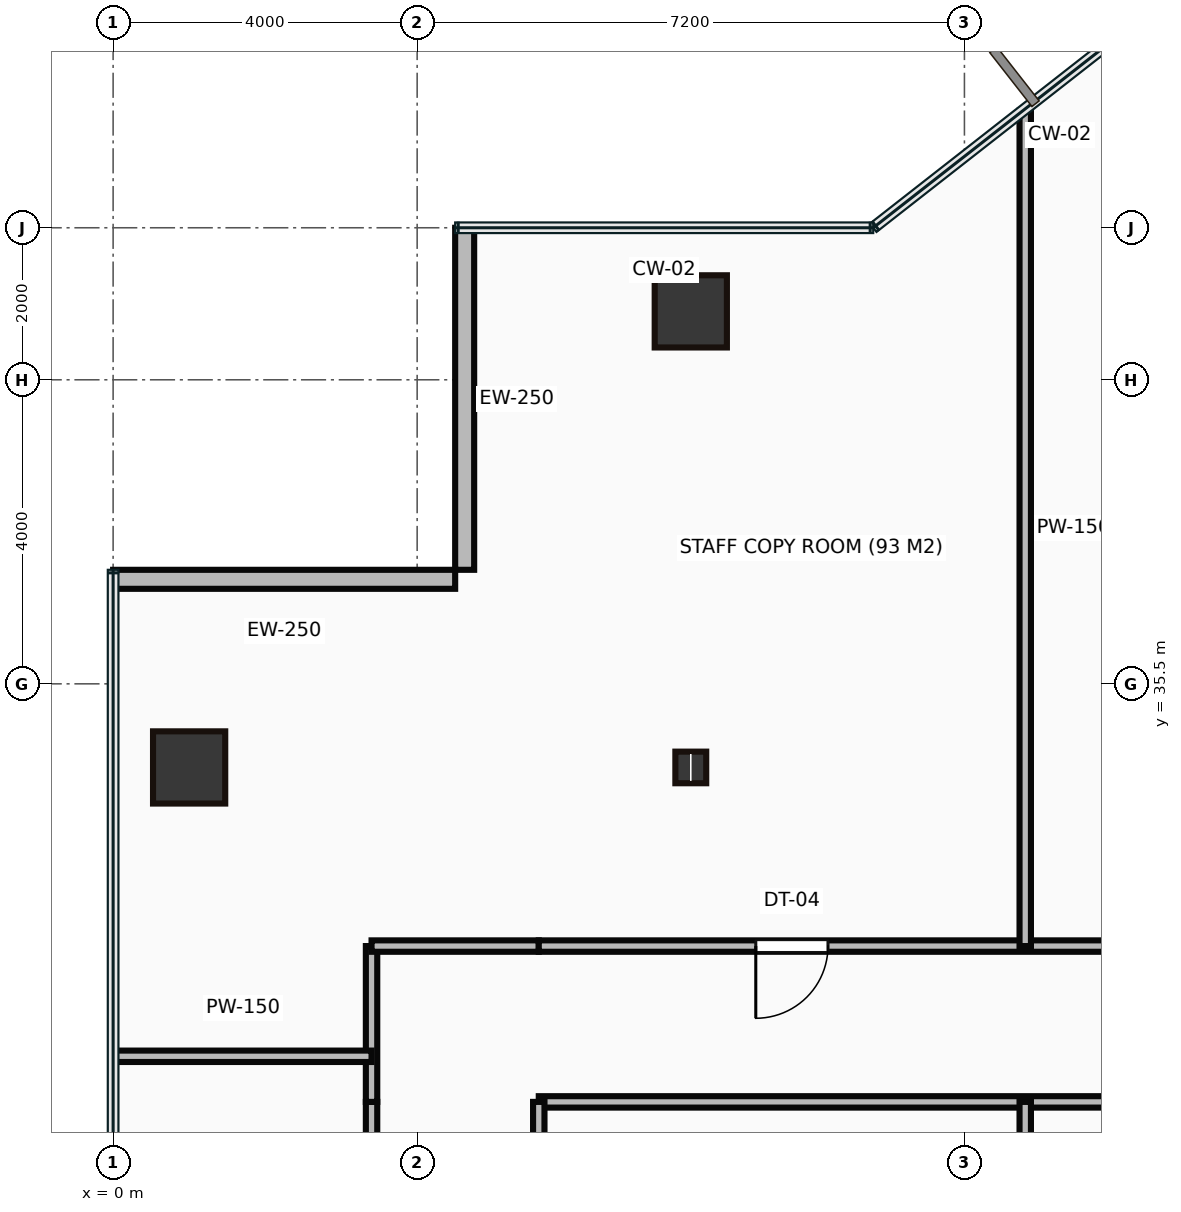
"""IFC4 building model, lengths in metres.
Left out: names, types, materials, properties, quantities, classifications, styles, units other than length and angle.
Written with IfcOpenShell. Run it as: python <this file> out.ifc"""

import sys

from ifc_helpers import new_model, si_unit, direction, frame, frame_2d, origin, origin_2d, place, context, subcontext, project, spatial, rectangle, hollow_rectangle, i_section, extrude, source, transform, mapped, element, fill, save


model = new_model("IFC4")
c1 = context("Model", 3, precision=1e-05, world=origin(), true_north=direction((0.0, 1.0)))
c2 = subcontext(c1, "Body", "Model", "MODEL_VIEW")
j1 = project(units=[si_unit("LENGTHUNIT", "METRE"), si_unit("PLANEANGLEUNIT", "RADIAN")], contexts=[c1])
p1 = place(None, origin())
s1 = spatial("IfcSite", under=j1, at=p1, CompositionType="ELEMENT")
p2 = place(p1, origin())
s2 = spatial("IfcBuilding", under=s1, at=p2, CompositionType="ELEMENT")
p3 = place(p2, frame((0.0, 0.0, 65.35)))
s3 = spatial("IfcBuildingStorey", under=s2, at=p3, CompositionType="ELEMENT", Elevation=65.35)
m1 = source(origin(), c2, "Body", "SweptSolid", [
    extrude(hollow_rectangle(XDim=0.95, YDim=0.95, WallThickness=0.045, at=origin_2d()), origin(), (0.0, 0.0, 1.0), 3.65),
])
p4 = place(p3, frame((1.0, 34.4, 0.0), z_axis=(0.0, 0.0, 1.0), x_axis=(1.0, 0.0, 0.0)))
e1 = element("IfcColumn", 1, at=p4, inside=s3, PredefinedType="COLUMN", context=c2, shape_type="MappedRepresentation", body=[
    mapped(m1, transform((0.0, 0.0, 0.0))),
])
m2 = source(origin(), c2, "Body", "SweptSolid", [
    extrude(i_section(OverallWidth=0.406, OverallDepth=0.416, WebThickness=0.03, FlangeThickness=0.048, at=origin_2d()), origin(), (0.0, 0.0, 1.0), 3.65),
])
p5 = place(p3, frame((7.6, 34.4, 0.0), z_axis=(0.0, 0.0, 1.0), x_axis=(1.0, 0.0, 0.0)))
e2 = element("IfcColumn", 2, at=p5, inside=s3, PredefinedType="COLUMN", context=c2, shape_type="MappedRepresentation", body=[
    mapped(m2, transform((0.0, 0.0, 0.0))),
])
p6 = place(p3, frame((7.6, 40.4, 0.0), z_axis=(0.0, 0.0, 1.0), x_axis=(1.0, 0.0, 0.0)))
e3 = element("IfcColumn", 3, at=p6, inside=s3, PredefinedType="COLUMN", context=c2, shape_type="MappedRepresentation", body=[
    mapped(m1, transform((0.0, 0.0, 0.0))),
])
m3 = source(origin(), c2, "Body", "SweptSolid", [
    extrude(rectangle(XDim=4.5, YDim=0.25, at=frame_2d((2.25, 0.0))), origin(), (0.0, 0.0, 1.0), 3.4),
])
for number, where, z_axis, x_axis in (
    (4, (4.625, 41.5, 0.0), (0.0, 0.0, 1.0), (0.0, -1.0, 0.0)),
    (5, (4.5, 36.875, 0.0), (0.0, 0.0, 1.0), (-1.0, 0.0, 0.0)),
):
    element("IfcWall", number, at=place(p3, frame(where, z_axis=z_axis, x_axis=x_axis)), inside=s3, PredefinedType="STANDARD", context=c2, shape_type="MappedRepresentation", body=[
        mapped(m3, transform((0.0, 0.0, 0.0))),
    ])
m4 = source(origin(), c2, "Body", "SweptSolid", [
    extrude(rectangle(XDim=13.75, YDim=0.15, at=frame_2d((6.875, 0.0))), origin(), (0.0, 0.0, 1.0), 3.4),
])
p7 = place(p3, frame((3.4, 16.25, 0.0), z_axis=(0.0, 0.0, 1.0), x_axis=(0.0, 1.0, 0.0)))
e6 = element("IfcWall", 6, at=p7, inside=s3, PredefinedType="PARTITIONING", context=c2, shape_type="MappedRepresentation", body=[
    mapped(m4, transform((0.0, 0.0, 0.0))),
])
p8 = place(p7, frame((6.4, 0.0, 0.0)))
e7 = element("IfcOpeningElement", 7, at=p8, cuts=e6, PredefinedType="OPENING", context=c2, shape_type="SweptSolid", body=[
    extrude(rectangle(XDim=0.95, YDim=2.15, at=frame_2d((0.475, 1.075))), frame((0.0, 0.085, 0.0), z_axis=(0.0, -1.0, 0.0), x_axis=(1.0, 0.0, 0.0)), (0.0, 0.0, 1.0), 0.17),
])
m5 = source(origin(), c2, "Body", "SweptSolid", [
    extrude(rectangle(XDim=2.05, YDim=0.15, at=frame_2d((1.025, 0.0))), origin(), (0.0, 0.0, 1.0), 3.4),
])
p9 = place(p3, frame((3.4, 30.0, 0.0), z_axis=(0.0, 0.0, 1.0), x_axis=(0.0, 1.0, 0.0)))
e8 = element("IfcWall", 8, at=p9, inside=s3, PredefinedType="PARTITIONING", context=c2, shape_type="MappedRepresentation", body=[
    mapped(m5, transform((0.0, 0.0, 0.0))),
])
m6 = source(origin(), c2, "Body", "SweptSolid", [
    extrude(rectangle(XDim=2.2, YDim=0.15, at=frame_2d((1.1, 0.0))), origin(), (0.0, 0.0, 1.0), 3.4),
])
p10 = place(p3, frame((3.4, 32.05, 0.0), z_axis=(0.0, 0.0, 1.0), x_axis=(1.0, 0.0, 0.0)))
e9 = element("IfcWall", 9, at=p10, inside=s3, PredefinedType="PARTITIONING", context=c2, shape_type="MappedRepresentation", body=[
    mapped(m6, transform((0.0, 0.0, 0.0))),
])
m7 = source(origin(), c2, "Body", "SweptSolid", [
    extrude(rectangle(XDim=31.6, YDim=0.15, at=frame_2d((15.8, 0.0))), origin(), (0.0, 0.0, 1.0), 3.4),
])
p11 = place(p3, frame((5.6, 32.05, 0.0), z_axis=(0.0, 0.0, 1.0), x_axis=(1.0, 0.0, 0.0)))
e10 = element("IfcWall", 10, at=p11, inside=s3, PredefinedType="PARTITIONING", context=c2, shape_type="MappedRepresentation", body=[
    mapped(m7, transform((0.0, 0.0, 0.0))),
])
p12 = place(p11, frame((2.855, 0.0, 0.0)))
e11 = element("IfcOpeningElement", 11, at=p12, cuts=e10, PredefinedType="OPENING", context=c2, shape_type="SweptSolid", body=[
    extrude(rectangle(XDim=0.95, YDim=2.15, at=frame_2d((0.475, 1.075))), frame((0.0, 0.085, 0.0), z_axis=(0.0, -1.0, 0.0), x_axis=(1.0, 0.0, 0.0)), (0.0, 0.0, 1.0), 0.17),
])
p13 = place(p11, frame((10.125, 0.0, 0.0)))
e12 = element("IfcOpeningElement", 12, at=p13, cuts=e10, PredefinedType="OPENING", context=c2, shape_type="SweptSolid", body=[
    extrude(rectangle(XDim=0.95, YDim=2.15, at=frame_2d((0.475, 1.075))), frame((0.0, 0.085, 0.0), z_axis=(0.0, -1.0, 0.0), x_axis=(1.0, 0.0, 0.0)), (0.0, 0.0, 1.0), 0.17),
])
p14 = place(p11, frame((18.925, 0.0, 0.0)))
e13 = element("IfcOpeningElement", 13, at=p14, cuts=e10, PredefinedType="OPENING", context=c2, shape_type="SweptSolid", body=[
    extrude(rectangle(XDim=0.95, YDim=2.15, at=frame_2d((0.475, 1.075))), frame((0.0, 0.085, 0.0), z_axis=(0.0, -1.0, 0.0), x_axis=(1.0, 0.0, 0.0)), (0.0, 0.0, 1.0), 0.17),
])
p15 = place(p11, frame((27.195, 0.0, 0.0)))
e14 = element("IfcOpeningElement", 14, at=p15, cuts=e10, PredefinedType="OPENING", context=c2, shape_type="SweptSolid", body=[
    extrude(rectangle(XDim=0.95, YDim=2.15, at=frame_2d((0.475, 1.075))), frame((0.0, 0.085, 0.0), z_axis=(0.0, -1.0, 0.0), x_axis=(1.0, 0.0, 0.0)), (0.0, 0.0, 1.0), 0.17),
])
m8 = source(origin(), c2, "Body", "SweptSolid", [
    extrude(rectangle(XDim=31.6, YDim=0.15, at=frame_2d((15.8, 0.0))), origin(), (0.0, 0.0, 1.0), 2.978),
])
p16 = place(p3, frame((37.2, 30.0, 0.0), z_axis=(0.0, 0.0, 1.0), x_axis=(-1.0, 0.0, 0.0)))
e15 = element("IfcWall", 15, at=p16, inside=s3, PredefinedType="PARTITIONING", context=c2, shape_type="MappedRepresentation", body=[
    mapped(m8, transform((0.0, 0.0, 0.0))),
])
p17 = place(p3, frame((5.6, 30.0, 0.0), z_axis=(0.0, 0.0, 1.0), x_axis=(0.0, -1.0, 0.0)))
e16 = element("IfcWall", 16, at=p17, inside=s3, PredefinedType="PARTITIONING", context=c2, shape_type="MappedRepresentation", body=[
    mapped(m4, transform((0.0, 0.0, 0.0))),
])
p18 = place(p17, frame((6.4, 0.0, 0.0)))
e17 = element("IfcOpeningElement", 17, at=p18, cuts=e16, PredefinedType="OPENING", context=c2, shape_type="SweptSolid", body=[
    extrude(rectangle(XDim=0.95, YDim=2.15, at=frame_2d((0.475, 1.075))), frame((0.0, 0.085, 0.0), z_axis=(0.0, -1.0, 0.0), x_axis=(1.0, 0.0, 0.0)), (0.0, 0.0, 1.0), 0.17),
])
m9 = source(origin(), c2, "Body", "SweptSolid", [
    extrude(rectangle(XDim=3.38, YDim=0.15, at=frame_2d((1.69, 0.0))), origin(), (0.0, 0.0, 1.0), 3.4),
])
p19 = place(p3, frame((0.02, 30.6, 0.0), z_axis=(0.0, 0.0, 1.0), x_axis=(1.0, 0.0, 0.0)))
e18 = element("IfcWall", 18, at=p19, inside=s3, PredefinedType="PARTITIONING", context=c2, shape_type="MappedRepresentation", body=[
    mapped(m9, transform((0.0, 0.0, 0.0))),
])
p20 = place(p3, frame((12.0, 30.0, 0.0), z_axis=(0.0, 0.0, 1.0), x_axis=(0.0, -1.0, 0.0)))
e19 = element("IfcWall", 19, at=p20, inside=s3, PredefinedType="PARTITIONING", context=c2, shape_type="MappedRepresentation", body=[
    mapped(m4, transform((0.0, 0.0, 0.0))),
])
m10 = source(origin(), c2, "Body", "SweptSolid", [
    extrude(rectangle(XDim=10.989, YDim=0.15, at=frame_2d((5.495, 0.0))), origin(), (0.0, 0.0, 1.0), 3.4),
])
p21 = place(p3, frame((12.0, 43.039, 0.0), z_axis=(0.0, 0.0, 1.0), x_axis=(0.0, -1.0, 0.0)))
e20 = element("IfcWall", 20, at=p21, inside=s3, PredefinedType="PARTITIONING", context=c2, shape_type="MappedRepresentation", body=[
    mapped(m10, transform((0.0, 0.0, 0.0))),
])
m11 = source(origin(), c2, "Body", "SweptSolid", [
    extrude(rectangle(XDim=0.95, YDim=2.15, at=frame_2d((0.475, 1.075))), frame((0.0, 0.025, 0.0), z_axis=(0.0, -1.0, 0.0), x_axis=(1.0, 0.0, 0.0)), (0.0, 0.0, 1.0), 0.05),
])
p22 = place(p12, origin())
e21 = element("IfcDoor", 21, at=p22, inside=s3, OperationType="SINGLE_SWING_LEFT", PredefinedType="DOOR", context=c2, shape_type="MappedRepresentation", body=[
    mapped(m11, transform((0.0, 0.0, 0.0))),
])
fill(e11, e21)
save(model, sys.argv[1])
